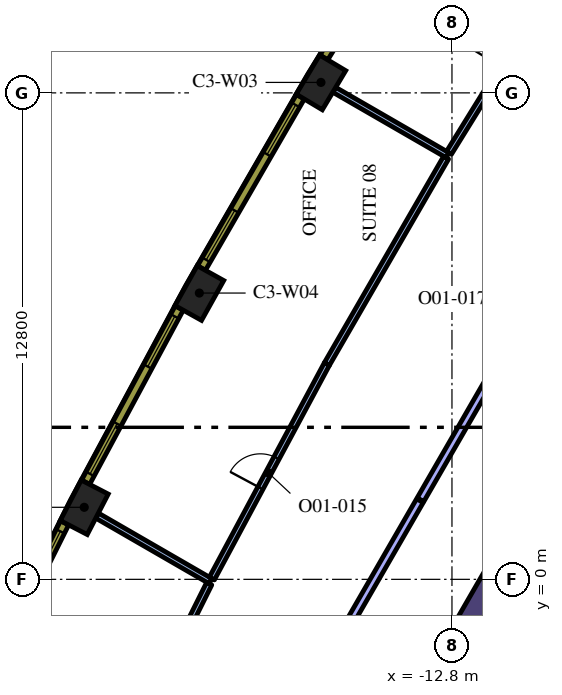
"""IFC4 building model, lengths in metres.
Left out: names, types, materials, properties, quantities, classifications, styles, units other than length and angle.
Written with IfcOpenShell. Run it as: python <this file> out.ifc"""

import sys

from ifc_helpers import new_model, si_unit, direction, frame, frame_2d, origin, origin_2d, place, context, subcontext, project, spatial, rectangle, extrude, element, fill, save


model = new_model("IFC4")
c1 = context("Model", 3, precision=1e-05, world=origin(), true_north=direction((0.0, 1.0)))
c2 = subcontext(c1, "Body", "Model", "MODEL_VIEW")
j1 = project(units=[si_unit("LENGTHUNIT", "METRE"), si_unit("PLANEANGLEUNIT", "RADIAN")], contexts=[c1])
p1 = place(None, origin())
s1 = spatial("IfcSite", under=j1, at=p1, CompositionType="ELEMENT")
p2 = place(p1, origin())
s2 = spatial("IfcBuilding", under=s1, at=p2, CompositionType="ELEMENT")
p3 = place(p2, frame((0.0, 0.0, 141.6)))
s3 = spatial("IfcBuildingStorey", under=s2, at=p3, CompositionType="ELEMENT", Elevation=141.6)
for number, where, z_axis, x_axis in (
    (1, (-16.247, 13.075, 0.0), (0.0, 0.0, 1.0), (-0.513, -0.858, 0.0)),
    (2, (-19.447, 7.533, 0.0), (0.0, 0.0, 1.0), (-0.487, -0.874, 0.0)),
    (3, (-22.476, 1.896, 0.0), (0.0, 0.0, 1.0), (-0.46, -0.888, 0.0)),
):
    element("IfcColumn", number, at=place(p3, frame(where, z_axis=z_axis, x_axis=x_axis)), inside=s3, PredefinedType="COLUMN", context=c2, shape_type="SweptSolid", body=[
        extrude(rectangle(XDim=1.2, YDim=0.8, at=origin_2d()), origin(), (0.0, 0.0, 1.0), 4.2),
    ])
p4 = place(p3, frame((-12.668, -1.842, 0.0), z_axis=(0.0, 0.0, 1.0), x_axis=(0.500003640647, 0.866023301845, 0.0)))
e4 = element("IfcWall", 4, at=p4, inside=s3, PredefinedType="SOLIDWALL", context=c2, shape_type="SweptSolid", body=[
    extrude(rectangle(XDim=15.858, YDim=0.8, at=frame_2d((7.929, 0.0))), origin(), (0.0, 0.0, 1.0), 4.2),
])
p5 = place(p3, frame((-12.917, 11.16, 0.0), z_axis=(0.0, 0.0, 1.0), x_axis=(-0.866039125629, 0.499976232315, 0.0)))
e5 = element("IfcWall", 5, at=p5, inside=s3, PredefinedType="PARTITIONING", context=c2, shape_type="SweptSolid", body=[
    extrude(rectangle(XDim=3.442, YDim=0.15, at=frame_2d((1.721, 0.0))), origin(), (0.0, 0.0, 1.0), 3.15),
])
p6 = place(p3, frame((-12.877, 11.224, 0.0), z_axis=(0.0, 0.0, 1.0), x_axis=(0.526202711334, 0.850359163286, 0.0)))
e6 = element("IfcWall", 6, at=p6, inside=s3, PredefinedType="PARTITIONING", context=c2, shape_type="SweptSolid", body=[
    extrude(rectangle(XDim=6.142, YDim=0.15, at=frame_2d((3.071, 0.0))), origin(), (0.0, 0.0, 1.0), 3.15),
])
p7 = place(p6, frame((2.642, 0.0, 0.0)))
e7 = element("IfcOpeningElement", 7, at=p7, cuts=e6, PredefinedType="OPENING", context=c2, shape_type="SweptSolid", body=[
    extrude(rectangle(XDim=0.9, YDim=2.1, at=frame_2d((0.45, 1.05))), frame((0.0, 0.085, 0.0), z_axis=(0.0, -1.0, 0.0), x_axis=(1.0, 0.0, 0.0)), (0.0, 0.0, 1.0), 0.17),
])
p8 = place(p3, frame((-19.154, -0.046, 0.0), z_axis=(0.0, 0.0, 1.0), x_axis=(-0.866051136095, 0.499955427682, 0.0)))
e8 = element("IfcWall", 8, at=p8, inside=s3, PredefinedType="PARTITIONING", context=c2, shape_type="SweptSolid", body=[
    extrude(rectangle(XDim=3.447, YDim=0.15, at=frame_2d((1.724, 0.0))), origin(), (0.0, 0.0, 1.0), 3.15),
])
p9 = place(p3, frame((-12.954, 11.095, 0.0), z_axis=(0.0, 0.0, 1.0), x_axis=(-0.500282785331, -0.865862076027, 0.0)))
e9 = element("IfcWall", 9, at=p9, inside=s3, PredefinedType="PARTITIONING", context=c2, shape_type="SweptSolid", body=[
    extrude(rectangle(XDim=6.273, YDim=0.15, at=frame_2d((3.136, 0.0))), origin(), (0.0, 0.0, 1.0), 3.15),
])
p10 = place(p3, frame((-19.118, 0.02, 0.0), z_axis=(0.0, 0.0, 1.0), x_axis=(0.47251230182, 0.88132407469, 0.0)))
e10 = element("IfcWall", 10, at=p10, inside=s3, PredefinedType="PARTITIONING", context=c2, shape_type="SweptSolid", body=[
    extrude(rectangle(XDim=6.404, YDim=0.15, at=frame_2d((3.202, 0.0))), origin(), (0.0, 0.0, 1.0), 3.15),
])
p11 = place(p10, frame((2.704, 0.0, 0.0)))
e11 = element("IfcOpeningElement", 11, at=p11, cuts=e10, PredefinedType="OPENING", context=c2, shape_type="SweptSolid", body=[
    extrude(rectangle(XDim=0.9, YDim=2.1, at=frame_2d((0.45, 1.05))), frame((0.0, 0.085, 0.0), z_axis=(0.0, -1.0, 0.0), x_axis=(1.0, 0.0, 0.0)), (0.0, 0.0, 1.0), 0.17),
])
p12 = place(p3, frame((-21.869, -5.493, 0.0), z_axis=(0.0, 0.0, 1.0), x_axis=(0.44618972677, 0.894938393257, 0.0)))
e12 = element("IfcWall", 12, at=p12, inside=s3, PredefinedType="PARTITIONING", context=c2, shape_type="SweptSolid", body=[
    extrude(rectangle(XDim=6.011, YDim=0.15, at=frame_2d((3.005, 0.0))), origin(), (0.0, 0.0, 1.0), 3.15),
])
p13 = place(p12, frame((2.511, 0.0, 0.0)))
e13 = element("IfcOpeningElement", 13, at=p13, cuts=e12, PredefinedType="OPENING", context=c2, shape_type="SweptSolid", body=[
    extrude(rectangle(XDim=0.9, YDim=2.1, at=frame_2d((0.45, 1.05))), frame((0.0, 0.085, 0.0), z_axis=(0.0, -1.0, 0.0), x_axis=(1.0, 0.0, 0.0)), (0.0, 0.0, 1.0), 0.17),
])
p14 = place(p3, frame((-8.628, 10.755, 0.0), z_axis=(0.0, 0.0, 1.0), x_axis=(-0.500004234368, -0.866022959057, 0.0)))
e14 = element("IfcWall", 14, at=p14, inside=s3, PredefinedType="PARTITIONING", context=c2, shape_type="SweptSolid", body=[
    extrude(rectangle(XDim=10.0, YDim=0.2, at=frame_2d((5.0, 0.0))), origin(), (0.0, 0.0, 1.0), 3.15),
])
p15 = place(p14, frame((4.5, 0.0, 0.0)))
e15 = element("IfcOpeningElement", 15, at=p15, cuts=e14, PredefinedType="OPENING", context=c2, shape_type="SweptSolid", body=[
    extrude(rectangle(XDim=1.0, YDim=2.1, at=frame_2d((0.5, 1.05))), frame((0.0, 0.11, 0.0), z_axis=(0.0, -1.0, 0.0), x_axis=(1.0, 0.0, 0.0)), (0.0, 0.0, 1.0), 0.22),
])
p16 = place(p3, frame((-13.643, 2.069, 0.0), z_axis=(0.0, 0.0, 1.0), x_axis=(-0.500012305324, -0.866018299186, 0.0)))
e16 = element("IfcWall", 16, at=p16, inside=s3, PredefinedType="PARTITIONING", context=c2, shape_type="SweptSolid", body=[
    extrude(rectangle(XDim=9.721, YDim=0.2, at=frame_2d((4.861, 0.0))), origin(), (0.0, 0.0, 1.0), 3.15),
])
p17 = place(p3, frame((-13.433, 18.156, 0.0), z_axis=(0.0, 0.0, 1.0), x_axis=(-0.526197926587, -0.850362124072, 0.0)))
e17 = element("IfcWall", 17, at=p17, inside=s3, PredefinedType="SOLIDWALL", context=c2, shape_type="SweptSolid", body=[
    extrude(rectangle(XDim=5.203, YDim=0.24, at=frame_2d((2.602, 0.0))), origin(), (0.0, 0.0, 1.0), 3.95),
])
p18 = place(p17, frame((0.248, 0.0, 0.9)))
e18 = element("IfcOpeningElement", 18, at=p18, cuts=e17, PredefinedType="OPENING", context=c2, shape_type="SweptSolid", body=[
    extrude(rectangle(XDim=1.5, YDim=2.55, at=frame_2d((0.75, 1.275))), frame((0.0, 0.13, 0.0), z_axis=(0.0, -1.0, 0.0), x_axis=(1.0, 0.0, 0.0)), (0.0, 0.0, 1.0), 0.26),
])
p19 = place(p17, frame((3.455, 0.0, 0.9)))
e19 = element("IfcOpeningElement", 19, at=p19, cuts=e17, PredefinedType="OPENING", context=c2, shape_type="SweptSolid", body=[
    extrude(rectangle(XDim=1.5, YDim=2.55, at=frame_2d((0.75, 1.275))), frame((0.0, 0.13, 0.0), z_axis=(0.0, -1.0, 0.0), x_axis=(1.0, 0.0, 0.0)), (0.0, 0.0, 1.0), 0.26),
])
p20 = place(p3, frame((-16.789, 12.697, 0.0), z_axis=(0.0, 0.0, 1.0), x_axis=(-0.500009456303, -0.866019944116, 0.0)))
e20 = element("IfcWall", 20, at=p20, inside=s3, PredefinedType="SOLIDWALL", context=c2, shape_type="SweptSolid", body=[
    extrude(rectangle(XDim=5.204, YDim=0.24, at=frame_2d((2.602, 0.0))), origin(), (0.0, 0.0, 1.0), 3.95),
])
p21 = place(p20, frame((0.248, 0.0, 0.9)))
e21 = element("IfcOpeningElement", 21, at=p21, cuts=e20, PredefinedType="OPENING", context=c2, shape_type="SweptSolid", body=[
    extrude(rectangle(XDim=1.5, YDim=2.55, at=frame_2d((0.75, 1.275))), frame((0.0, 0.13, 0.0), z_axis=(0.0, -1.0, 0.0), x_axis=(1.0, 0.0, 0.0)), (0.0, 0.0, 1.0), 0.26),
])
p22 = place(p20, frame((3.455, 0.0, 0.9)))
e22 = element("IfcOpeningElement", 22, at=p22, cuts=e20, PredefinedType="OPENING", context=c2, shape_type="SweptSolid", body=[
    extrude(rectangle(XDim=1.5, YDim=2.55, at=frame_2d((0.75, 1.275))), frame((0.0, 0.13, 0.0), z_axis=(0.0, -1.0, 0.0), x_axis=(1.0, 0.0, 0.0)), (0.0, 0.0, 1.0), 0.26),
])
p23 = place(p3, frame((-19.977, 7.139, 0.0), z_axis=(0.0, 0.0, 1.0), x_axis=(-0.473349833294, -0.880874528704, 0.0)))
e23 = element("IfcWall", 23, at=p23, inside=s3, PredefinedType="SOLIDWALL", context=c2, shape_type="SweptSolid", body=[
    extrude(rectangle(XDim=5.204, YDim=0.24, at=frame_2d((2.602, 0.0))), origin(), (0.0, 0.0, 1.0), 3.95),
])
p24 = place(p23, frame((0.248, 0.0, 0.9)))
e24 = element("IfcOpeningElement", 24, at=p24, cuts=e23, PredefinedType="OPENING", context=c2, shape_type="SweptSolid", body=[
    extrude(rectangle(XDim=1.5, YDim=2.55, at=frame_2d((0.75, 1.275))), frame((0.0, 0.13, 0.0), z_axis=(0.0, -1.0, 0.0), x_axis=(1.0, 0.0, 0.0)), (0.0, 0.0, 1.0), 0.26),
])
p25 = place(p23, frame((3.455, 0.0, 0.9)))
e25 = element("IfcOpeningElement", 25, at=p25, cuts=e23, PredefinedType="OPENING", context=c2, shape_type="SweptSolid", body=[
    extrude(rectangle(XDim=1.5, YDim=2.55, at=frame_2d((0.75, 1.275))), frame((0.0, 0.13, 0.0), z_axis=(0.0, -1.0, 0.0), x_axis=(1.0, 0.0, 0.0)), (0.0, 0.0, 1.0), 0.26),
])
p26 = place(p3, frame((-22.994, 1.485, 0.0), z_axis=(0.0, 0.0, 1.0), x_axis=(-0.446256171312, -0.8949052629, 0.0)))
e26 = element("IfcWall", 26, at=p26, inside=s3, PredefinedType="SOLIDWALL", context=c2, shape_type="SweptSolid", body=[
    extrude(rectangle(XDim=5.203, YDim=0.24, at=frame_2d((2.602, 0.0))), origin(), (0.0, 0.0, 1.0), 3.95),
])
p27 = place(p26, frame((0.248, 0.0, 0.9)))
e27 = element("IfcOpeningElement", 27, at=p27, cuts=e26, PredefinedType="OPENING", context=c2, shape_type="SweptSolid", body=[
    extrude(rectangle(XDim=1.5, YDim=2.55, at=frame_2d((0.75, 1.275))), frame((0.0, 0.13, 0.0), z_axis=(0.0, -1.0, 0.0), x_axis=(1.0, 0.0, 0.0)), (0.0, 0.0, 1.0), 0.26),
])
p28 = place(p26, frame((3.455, 0.0, 0.9)))
e28 = element("IfcOpeningElement", 28, at=p28, cuts=e26, PredefinedType="OPENING", context=c2, shape_type="SweptSolid", body=[
    extrude(rectangle(XDim=1.5, YDim=2.55, at=frame_2d((0.75, 1.275))), frame((0.0, 0.13, 0.0), z_axis=(0.0, -1.0, 0.0), x_axis=(1.0, 0.0, 0.0)), (0.0, 0.0, 1.0), 0.26),
])
p29 = place(p11, origin())
e29 = element("IfcDoor", 29, at=p29, inside=s3, OperationType="SINGLE_SWING_LEFT", PredefinedType="DOOR", context=c2, shape_type="SweptSolid", body=[
    extrude(rectangle(XDim=0.9, YDim=2.1, at=frame_2d((0.45, 1.05))), frame((0.0, 0.025, 0.0), z_axis=(0.0, -1.0, 0.0), x_axis=(1.0, 0.0, 0.0)), (0.0, 0.0, 1.0), 0.05),
])
fill(e11, e29)
p30 = place(p21, origin())
e30 = element("IfcWindow", 30, at=p30, inside=s3, PartitioningType="SINGLE_PANEL", PredefinedType="WINDOW", context=c2, shape_type="SweptSolid", body=[
    extrude(rectangle(XDim=1.5, YDim=2.55, at=frame_2d((0.75, 1.275))), frame((0.0, 0.04, 0.0), z_axis=(0.0, -1.0, 0.0), x_axis=(1.0, 0.0, 0.0)), (0.0, 0.0, 1.0), 0.06),
])
fill(e21, e30)
p31 = place(p22, origin())
e31 = element("IfcWindow", 31, at=p31, inside=s3, PartitioningType="SINGLE_PANEL", PredefinedType="WINDOW", context=c2, shape_type="SweptSolid", body=[
    extrude(rectangle(XDim=1.5, YDim=2.55, at=frame_2d((0.75, 1.275))), frame((0.0, 0.04, 0.0), z_axis=(0.0, -1.0, 0.0), x_axis=(1.0, 0.0, 0.0)), (0.0, 0.0, 1.0), 0.06),
])
fill(e22, e31)
p32 = place(p24, origin())
e32 = element("IfcWindow", 32, at=p32, inside=s3, PartitioningType="SINGLE_PANEL", PredefinedType="WINDOW", context=c2, shape_type="SweptSolid", body=[
    extrude(rectangle(XDim=1.5, YDim=2.55, at=frame_2d((0.75, 1.275))), frame((0.0, 0.04, 0.0), z_axis=(0.0, -1.0, 0.0), x_axis=(1.0, 0.0, 0.0)), (0.0, 0.0, 1.0), 0.06),
])
fill(e24, e32)
p33 = place(p25, origin())
e33 = element("IfcWindow", 33, at=p33, inside=s3, PartitioningType="SINGLE_PANEL", PredefinedType="WINDOW", context=c2, shape_type="SweptSolid", body=[
    extrude(rectangle(XDim=1.5, YDim=2.55, at=frame_2d((0.75, 1.275))), frame((0.0, 0.04, 0.0), z_axis=(0.0, -1.0, 0.0), x_axis=(1.0, 0.0, 0.0)), (0.0, 0.0, 1.0), 0.06),
])
fill(e25, e33)
p34 = place(p27, origin())
e34 = element("IfcWindow", 34, at=p34, inside=s3, PartitioningType="SINGLE_PANEL", PredefinedType="WINDOW", context=c2, shape_type="SweptSolid", body=[
    extrude(rectangle(XDim=1.5, YDim=2.55, at=frame_2d((0.75, 1.275))), frame((0.0, 0.04, 0.0), z_axis=(0.0, -1.0, 0.0), x_axis=(1.0, 0.0, 0.0)), (0.0, 0.0, 1.0), 0.06),
])
fill(e27, e34)
save(model, sys.argv[1])
